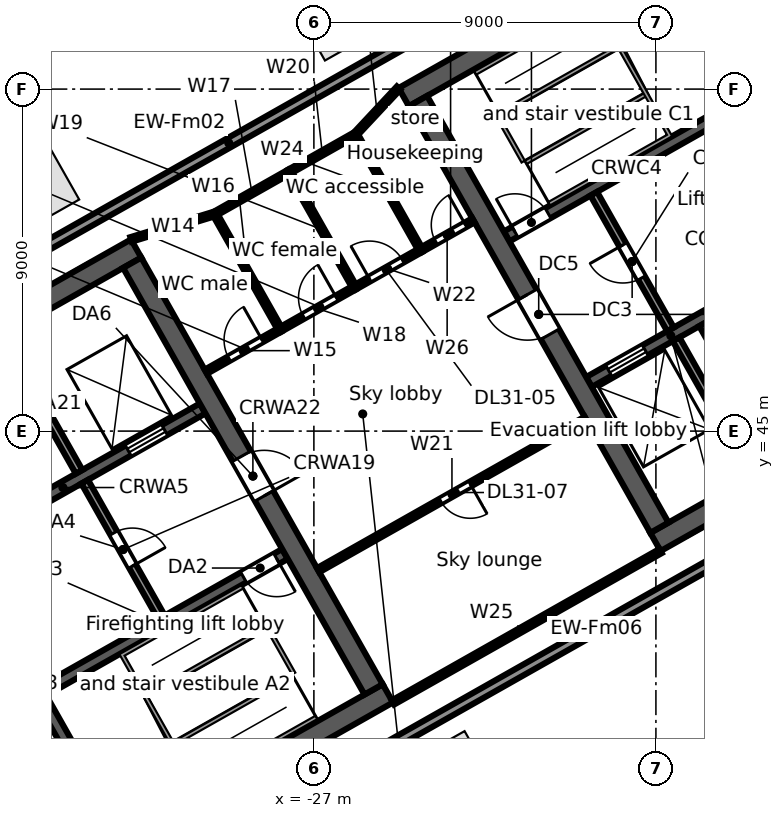
"""IFC4 building model, lengths in metres.
Left out: names, types, materials, properties, quantities, classifications, styles, units other than length and angle.
Written with IfcOpenShell. Run it as: python <this file> out.ifc"""

import sys

from ifc_helpers import new_model, si_unit, direction, frame, frame_2d, origin, origin_2d, place, context, subcontext, project, spatial, rectangle, extrude, element, fill, save


model = new_model("IFC4")
c1 = context("Model", 3, precision=1e-05, world=origin(), true_north=direction((0.0, 1.0)))
c2 = subcontext(c1, "Body", "Model", "MODEL_VIEW")
j1 = project(units=[si_unit("LENGTHUNIT", "METRE"), si_unit("PLANEANGLEUNIT", "RADIAN")], contexts=[c1])
p1 = place(None, origin())
s1 = spatial("IfcSite", under=j1, at=p1, CompositionType="ELEMENT")
p2 = place(p1, origin())
s2 = spatial("IfcBuilding", under=s1, at=p2, CompositionType="ELEMENT")
p3 = place(p2, frame((0.0, 0.0, 149.9)))
s3 = spatial("IfcBuildingStorey", under=s2, at=p3, CompositionType="ELEMENT", Elevation=149.9)
for number, where, z_axis, x_axis in (
    (1, (-26.388, 55.91, 0.0), (0.0, 0.0, 1.0), (-0.87, -0.492, 0.0)),
    (2, (-34.334, 51.414, 0.0), (0.0, 0.0, 1.0), (-0.87, -0.492, 0.0)),
    (3, (-23.356, 35.946, 0.0), (0.0, 0.0, 1.0), (0.87, 0.492, 0.0)),
):
    element("IfcColumn", number, at=place(p3, frame(where, z_axis=z_axis, x_axis=x_axis)), inside=s3, PredefinedType="COLUMN", context=c2, shape_type="SweptSolid", body=[
        extrude(rectangle(XDim=1.7, YDim=1.7, at=origin_2d()), origin(), (0.0, 0.0, 1.0), 5.0),
    ])
p4 = place(p3, frame((-56.251, 37.302, 0.0), z_axis=(0.0, 0.0, 1.0), x_axis=(0.87035543516, 0.49242402103, 0.0)))
e4 = element("IfcWall", 4, at=p4, inside=s3, PredefinedType="STANDARD", context=c2, shape_type="SweptSolid", body=[
    extrude(rectangle(XDim=62.067, YDim=0.25, at=frame_2d((31.033, 0.0))), origin(), (0.0, 0.0, 1.0), 3.872),
])
p5 = place(p3, frame((-0.364, 50.666, 0.0), z_axis=(0.0, 0.0, 1.0), x_axis=(-0.870355021882, -0.492424751494, 0.0)))
e5 = element("IfcWall", 5, at=p5, inside=s3, PredefinedType="STANDARD", context=c2, shape_type="SweptSolid", body=[
    extrude(rectangle(XDim=44.126, YDim=0.25, at=frame_2d((22.063, 0.0))), origin(), (0.0, 0.0, 1.0), 3.768),
])
p6 = place(p3, frame((-39.85, 29.727, 0.0), z_axis=(0.0, 0.0, 1.0), x_axis=(0.870359753402, 0.492416388494, 0.0)))
e6 = element("IfcWall", 6, at=p6, inside=s3, PredefinedType="SOLIDWALL", context=c2, shape_type="SweptSolid", body=[
    extrude(rectangle(XDim=17.0, YDim=0.55, at=frame_2d((8.5, 0.0))), origin(), (0.0, 0.0, 1.0), 4.68),
])
p7 = place(p6, frame((7.2, 0.0, 0.0)))
e7 = element("IfcOpeningElement", 7, at=p7, cuts=e6, PredefinedType="OPENING", context=c2, shape_type="SweptSolid", body=[
    extrude(rectangle(XDim=1.2, YDim=2.1, at=frame_2d((0.6, 1.05))), frame((0.0, 0.285, 0.0), z_axis=(0.0, -1.0, 0.0), x_axis=(1.0, 0.0, 0.0)), (0.0, 0.0, 1.0), 0.57),
])
p8 = place(p3, frame((-34.245, 38.097, 0.0), z_axis=(0.0, 0.0, 1.0), x_axis=(0.870360741098, 0.49241464271, 0.0)))
e8 = element("IfcWall", 8, at=p8, inside=s3, PredefinedType="SOLIDWALL", context=c2, shape_type="SweptSolid", body=[
    extrude(rectangle(XDim=7.45, YDim=0.3, at=frame_2d((3.725, 0.0))), origin(), (0.0, 0.0, 1.0), 4.68),
])
p9 = place(p8, frame((6.2, 0.0, 0.0)))
e9 = element("IfcOpeningElement", 9, at=p9, cuts=e8, PredefinedType="OPENING", context=c2, shape_type="SweptSolid", body=[
    extrude(rectangle(XDim=1.0, YDim=2.1, at=frame_2d((0.5, 1.05))), frame((0.0, 0.16, 0.0), z_axis=(0.0, -1.0, 0.0), x_axis=(1.0, 0.0, 0.0)), (0.0, 0.0, 1.0), 0.32),
])
p10 = place(p3, frame((-37.282, 41.435, 0.0), z_axis=(0.0, 0.0, 1.0), x_axis=(0.870359895813, 0.492416136779, 0.0)))
e10 = element("IfcWall", 10, at=p10, inside=s3, PredefinedType="SOLIDWALL", context=c2, shape_type="SweptSolid", body=[
    extrude(rectangle(XDim=8.45, YDim=0.3, at=frame_2d((4.225, 0.0))), origin(), (0.0, 0.0, 1.0), 4.68),
])
p11 = place(p10, frame((6.2, 0.0, 0.0)))
e11 = element("IfcOpeningElement", 11, at=p11, cuts=e10, PredefinedType="OPENING", context=c2, shape_type="SweptSolid", body=[
    extrude(rectangle(XDim=1.1, YDim=2.1, at=frame_2d((0.55, 1.05))), frame((0.0, 0.16, 0.0), z_axis=(0.0, -1.0, 0.0), x_axis=(1.0, 0.0, 0.0)), (0.0, 0.0, 1.0), 0.32),
])
p12 = place(p10, frame((1.95, 0.0, 0.0)))
e12 = element("IfcOpeningElement", 12, at=p12, cuts=e10, PredefinedType="OPENING", context=c2, shape_type="SweptSolid", body=[
    extrude(rectangle(XDim=0.9, YDim=2.1, at=frame_2d((0.45, 1.05))), frame((0.0, 0.16, 0.0), z_axis=(0.0, -1.0, 0.0), x_axis=(1.0, 0.0, 0.0)), (0.0, 0.0, 1.0), 0.32),
])
p13 = place(p3, frame((-46.473, 41.434, 0.0), z_axis=(0.0, 0.0, 1.0), x_axis=(0.870359753402, 0.492416388494, 0.0)))
e13 = element("IfcWall", 13, at=p13, inside=s3, PredefinedType="SOLIDWALL", context=c2, shape_type="SweptSolid", body=[
    extrude(rectangle(XDim=17.0, YDim=0.55, at=frame_2d((8.5, 0.0))), origin(), (0.0, 0.0, 1.0), 4.68),
])
p14 = place(p3, frame((-34.171, 37.967, 0.0), z_axis=(0.0, 0.0, 1.0), x_axis=(0.492382931784, -0.870378681085, 0.0)))
e14 = element("IfcWall", 14, at=p14, inside=s3, PredefinedType="SOLIDWALL", context=c2, shape_type="SweptSolid", body=[
    extrude(rectangle(XDim=4.1, YDim=0.3, at=frame_2d((2.05, 0.0))), origin(), (0.0, 0.0, 1.0), 4.68),
])
p15 = place(p3, frame((-33.031, 43.667, 0.0), z_axis=(0.0, 0.0, 1.0), x_axis=(0.492408451753, -0.87036424366, 0.0)))
e15 = element("IfcWall", 15, at=p15, inside=s3, PredefinedType="PARTITIONING", context=c2, shape_type="SweptSolid", body=[
    extrude(rectangle(XDim=4.1, YDim=0.2, at=frame_2d((2.05, 0.0))), origin(), (0.0, 0.0, 1.0), 4.68),
])
p16 = place(p15, frame((1.55, 0.0, 0.0)))
e16 = element("IfcOpeningElement", 16, at=p16, cuts=e15, PredefinedType="OPENING", context=c2, shape_type="SweptSolid", body=[
    extrude(rectangle(XDim=1.0, YDim=2.1, at=frame_2d((0.5, 1.05))), frame((0.0, 0.11, 0.0), z_axis=(0.0, -1.0, 0.0), x_axis=(1.0, 0.0, 0.0)), (0.0, 0.0, 1.0), 0.22),
])
p17 = place(p3, frame((-35.197, 47.497, 0.0), z_axis=(0.0, 0.0, 1.0), x_axis=(0.492453559952, -0.87033872216, 0.0)))
e17 = element("IfcWall", 17, at=p17, inside=s3, PredefinedType="SOLIDWALL", context=c2, shape_type="SweptSolid", body=[
    extrude(rectangle(XDim=4.1, YDim=0.2, at=frame_2d((2.05, 0.0))), origin(), (0.0, 0.0, 1.0), 4.68),
])
p18 = place(p3, frame((-31.781, 49.43, 0.0), z_axis=(0.0, 0.0, 1.0), x_axis=(0.492427022044, -0.870353737259, 0.0)))
e18 = element("IfcWall", 18, at=p18, inside=s3, PredefinedType="SOLIDWALL", context=c2, shape_type="SweptSolid", body=[
    extrude(rectangle(XDim=12.9, YDim=0.55, at=frame_2d((6.45, 0.0))), origin(), (0.0, 0.0, 1.0), 4.68),
])
p19 = place(p18, frame((5.85, 0.0, 0.0)))
e19 = element("IfcOpeningElement", 19, at=p19, cuts=e18, PredefinedType="OPENING", context=c2, shape_type="SweptSolid", body=[
    extrude(rectangle(XDim=1.2, YDim=2.1, at=frame_2d((0.6, 1.05))), frame((0.0, 0.285, 0.0), z_axis=(0.0, -1.0, 0.0), x_axis=(1.0, 0.0, 0.0)), (0.0, 0.0, 1.0), 0.57),
])
p20 = place(p3, frame((-18.012, 42.083, 0.0), z_axis=(0.0, 0.0, 1.0), x_axis=(0.870360574057, 0.492414937962, 0.0)))
e20 = element("IfcWall", 20, at=p20, inside=s3, PredefinedType="SOLIDWALL", context=c2, shape_type="SweptSolid", body=[
    extrude(rectangle(XDim=15.0, YDim=0.55, at=frame_2d((7.5, 0.0))), origin(), (0.0, 0.0, 1.0), 4.68),
])
p21 = place(p20, frame((6.1, 0.0, 0.0)))
e21 = element("IfcOpeningElement", 21, at=p21, cuts=e20, PredefinedType="OPENING", context=c2, shape_type="SweptSolid", body=[
    extrude(rectangle(XDim=1.2, YDim=2.1, at=frame_2d((0.6, 1.05))), frame((0.0, 0.285, 0.0), z_axis=(0.0, -1.0, 0.0), x_axis=(1.0, 0.0, 0.0)), (0.0, 0.0, 1.0), 0.57),
])
p22 = place(p3, frame((-19.762, 46.292, 0.0), z_axis=(0.0, 0.0, 1.0), x_axis=(0.870359758983, 0.49241637863, 0.0)))
e22 = element("IfcWall", 22, at=p22, inside=s3, PredefinedType="SOLIDWALL", context=c2, shape_type="SweptSolid", body=[
    extrude(rectangle(XDim=4.95, YDim=0.3, at=frame_2d((2.475, 0.0))), origin(), (0.0, 0.0, 1.0), 4.68),
])
p23 = place(p22, frame((0.6, 0.0, 0.0)))
e23 = element("IfcOpeningElement", 23, at=p23, cuts=e22, PredefinedType="OPENING", context=c2, shape_type="SweptSolid", body=[
    extrude(rectangle(XDim=1.1, YDim=2.1, at=frame_2d((0.55, 1.05))), frame((0.0, 0.16, 0.0), z_axis=(0.0, -1.0, 0.0), x_axis=(1.0, 0.0, 0.0)), (0.0, 0.0, 1.0), 0.32),
])
p24 = place(p22, frame((3.7, 0.0, 0.0)))
e24 = element("IfcOpeningElement", 24, at=p24, cuts=e22, PredefinedType="OPENING", context=c2, shape_type="SweptSolid", body=[
    extrude(rectangle(XDim=0.9, YDim=2.1, at=frame_2d((0.45, 1.05))), frame((0.0, 0.16, 0.0), z_axis=(0.0, -1.0, 0.0), x_axis=(1.0, 0.0, 0.0)), (0.0, 0.0, 1.0), 0.32),
])
p25 = place(p3, frame((-21.928, 50.121, 0.0), z_axis=(0.0, 0.0, 1.0), x_axis=(0.870340732628, 0.49245000673, 0.0)))
e25 = element("IfcWall", 25, at=p25, inside=s3, PredefinedType="SOLIDWALL", context=c2, shape_type="SweptSolid", body=[
    extrude(rectangle(XDim=7.25, YDim=0.3, at=frame_2d((3.625, 0.0))), origin(), (0.0, 0.0, 1.0), 4.68),
])
p26 = place(p25, frame((0.25, 0.0, 0.0)))
e26 = element("IfcOpeningElement", 26, at=p26, cuts=e25, PredefinedType="OPENING", context=c2, shape_type="SweptSolid", body=[
    extrude(rectangle(XDim=1.0, YDim=2.1, at=frame_2d((0.5, 1.05))), frame((0.0, 0.16, 0.0), z_axis=(0.0, -1.0, 0.0), x_axis=(1.0, 0.0, 0.0)), (0.0, 0.0, 1.0), 0.32),
])
p27 = place(p3, frame((-24.635, 53.789, 0.0), z_axis=(0.0, 0.0, 1.0), x_axis=(0.870360574057, 0.492414937962, 0.0)))
e27 = element("IfcWall", 27, at=p27, inside=s3, PredefinedType="SOLIDWALL", context=c2, shape_type="SweptSolid", body=[
    extrude(rectangle(XDim=15.0, YDim=0.55, at=frame_2d((7.5, 0.0))), origin(), (0.0, 0.0, 1.0), 4.68),
])
p28 = place(p3, frame((-24.26, 53.685, 0.0), z_axis=(0.0, 0.0, 1.0), x_axis=(0.492427022044, -0.870353737259, 0.0)))
e28 = element("IfcWall", 28, at=p28, inside=s3, PredefinedType="SOLIDWALL", context=c2, shape_type="SweptSolid", body=[
    extrude(rectangle(XDim=12.9, YDim=0.55, at=frame_2d((6.45, 0.0))), origin(), (0.0, 0.0, 1.0), 4.68),
])
p29 = place(p28, frame((5.85, 0.0, 0.0)))
e29 = element("IfcOpeningElement", 29, at=p29, cuts=e28, PredefinedType="OPENING", context=c2, shape_type="SweptSolid", body=[
    extrude(rectangle(XDim=1.2, YDim=2.1, at=frame_2d((0.6, 1.05))), frame((0.0, 0.285, 0.0), z_axis=(0.0, -1.0, 0.0), x_axis=(1.0, 0.0, 0.0)), (0.0, 0.0, 1.0), 0.57),
])
p30 = place(p3, frame((-17.469, 47.417, 0.0), z_axis=(0.0, 0.0, 1.0), x_axis=(0.492453559952, -0.87033872216, 0.0)))
e30 = element("IfcWall", 30, at=p30, inside=s3, PredefinedType="SOLIDWALL", context=c2, shape_type="SweptSolid", body=[
    extrude(rectangle(XDim=4.1, YDim=0.2, at=frame_2d((2.05, 0.0))), origin(), (0.0, 0.0, 1.0), 4.68),
])
p31 = place(p3, frame((-19.635, 51.246, 0.0), z_axis=(0.0, 0.0, 1.0), x_axis=(0.492408451753, -0.87036424366, 0.0)))
e31 = element("IfcWall", 31, at=p31, inside=s3, PredefinedType="PARTITIONING", context=c2, shape_type="SweptSolid", body=[
    extrude(rectangle(XDim=4.1, YDim=0.2, at=frame_2d((2.05, 0.0))), origin(), (0.0, 0.0, 1.0), 4.68),
])
p32 = place(p31, frame((1.55, 0.0, 0.0)))
e32 = element("IfcOpeningElement", 32, at=p32, cuts=e31, PredefinedType="OPENING", context=c2, shape_type="SweptSolid", body=[
    extrude(rectangle(XDim=1.0, YDim=2.1, at=frame_2d((0.5, 1.05))), frame((0.0, 0.11, 0.0), z_axis=(0.0, -1.0, 0.0), x_axis=(1.0, 0.0, 0.0)), (0.0, 0.0, 1.0), 0.22),
])
p33 = place(p3, frame((-16.772, 47.811, 0.0), z_axis=(0.0, 0.0, 1.0), x_axis=(0.492428039142, -0.870353161807, 0.0)))
e33 = element("IfcWall", 33, at=p33, inside=s3, PredefinedType="SOLIDWALL", context=c2, shape_type="SweptSolid", body=[
    extrude(rectangle(XDim=4.1, YDim=0.2, at=frame_2d((2.05, 0.0))), origin(), (0.0, 0.0, 1.0), 4.68),
])
p34 = place(p3, frame((-17.711, 57.39, 0.0), z_axis=(0.0, 0.0, 1.0), x_axis=(0.492408451753, -0.87036424366, 0.0)))
e34 = element("IfcWall", 34, at=p34, inside=s3, PredefinedType="SOLIDWALL", context=c2, shape_type="SweptSolid", body=[
    extrude(rectangle(XDim=4.1, YDim=0.3, at=frame_2d((2.05, 0.0))), origin(), (0.0, 0.0, 1.0), 4.68),
])
p35 = place(p3, frame((-31.812, 50.044, 0.0), z_axis=(0.0, 0.0, 1.0), x_axis=(0.956397612161, 0.292067813107, 0.0)))
e35 = element("IfcWall", 35, at=p35, inside=s3, PredefinedType="PARTITIONING", context=c2, shape_type="SweptSolid", body=[
    extrude(rectangle(XDim=2.305, YDim=0.125, at=frame_2d((1.152, 0.0))), origin(), (0.0, 0.0, 1.0), 4.68),
])
p36 = place(p3, frame((-29.843, 46.563, 0.0), z_axis=(0.0, 0.0, 1.0), x_axis=(0.870437546499, 0.492278861667, 0.0)))
e36 = element("IfcWall", 36, at=p36, inside=s3, PredefinedType="PARTITIONING", context=c2, shape_type="SweptSolid", body=[
    extrude(rectangle(XDim=2.25, YDim=0.125, at=frame_2d((1.125, 0.0))), origin(), (0.0, 0.0, 1.0), 4.68),
])
p37 = place(p36, frame((0.7, 0.0, 0.0)))
e37 = element("IfcOpeningElement", 37, at=p37, cuts=e36, PredefinedType="OPENING", context=c2, shape_type="SweptSolid", body=[
    extrude(rectangle(XDim=1.0, YDim=2.1, at=frame_2d((0.5, 1.05))), frame((0.0, 0.073, 0.0), z_axis=(0.0, -1.0, 0.0), x_axis=(1.0, 0.0, 0.0)), (0.0, 0.0, 1.0), 0.145),
])
p38 = place(p3, frame((-29.608, 50.717, 0.0), z_axis=(0.0, 0.0, 1.0), x_axis=(0.492521469645, -0.870300294116, 0.0)))
e38 = element("IfcWall", 38, at=p38, inside=s3, PredefinedType="PARTITIONING", context=c2, shape_type="SweptSolid", body=[
    extrude(rectangle(XDim=3.5, YDim=0.125, at=frame_2d((1.75, 0.0))), origin(), (0.0, 0.0, 1.0), 4.68),
])
p39 = place(p3, frame((-29.608, 50.717, 0.0), z_axis=(0.0, 0.0, 1.0), x_axis=(0.870332332106, 0.492464853254, 0.0)))
e39 = element("IfcWall", 39, at=p39, inside=s3, PredefinedType="PARTITIONING", context=c2, shape_type="SweptSolid", body=[
    extrude(rectangle(XDim=2.25, YDim=0.125, at=frame_2d((1.125, 0.0))), origin(), (0.0, 0.0, 1.0), 4.68),
])
p40 = place(p3, frame((-27.884, 47.671, 0.0), z_axis=(0.0, 0.0, 1.0), x_axis=(0.870285818058, 0.4925470484, 0.0)))
e40 = element("IfcWall", 40, at=p40, inside=s3, PredefinedType="PARTITIONING", context=c2, shape_type="SweptSolid", body=[
    extrude(rectangle(XDim=2.25, YDim=0.125, at=frame_2d((1.125, 0.0))), origin(), (0.0, 0.0, 1.0), 4.68),
])
p41 = place(p40, frame((0.7, 0.0, 0.0)))
e41 = element("IfcOpeningElement", 41, at=p41, cuts=e40, PredefinedType="OPENING", context=c2, shape_type="SweptSolid", body=[
    extrude(rectangle(XDim=1.0, YDim=2.1, at=frame_2d((0.5, 1.05))), frame((0.0, 0.073, 0.0), z_axis=(0.0, -1.0, 0.0), x_axis=(1.0, 0.0, 0.0)), (0.0, 0.0, 1.0), 0.145),
])
p42 = place(p3, frame((-27.65, 51.825, 0.0), z_axis=(0.0, 0.0, 1.0), x_axis=(0.492551369934, -0.870283372228, 0.0)))
e42 = element("IfcWall", 42, at=p42, inside=s3, PredefinedType="PARTITIONING", context=c2, shape_type="SweptSolid", body=[
    extrude(rectangle(XDim=3.5, YDim=0.125, at=frame_2d((1.75, 0.0))), origin(), (0.0, 0.0, 1.0), 4.68),
])
p43 = place(p3, frame((-27.65, 51.825, 0.0), z_axis=(0.0, 0.0, 1.0), x_axis=(0.870330884088, 0.492467412326, 0.0)))
e43 = element("IfcWall", 43, at=p43, inside=s3, PredefinedType="PARTITIONING", context=c2, shape_type="SweptSolid", body=[
    extrude(rectangle(XDim=2.0, YDim=0.125, at=frame_2d((1.0, 0.0))), origin(), (0.0, 0.0, 1.0), 4.68),
])
p44 = place(p3, frame((-26.888, 41.34, 0.0), z_axis=(0.0, 0.0, 1.0), x_axis=(0.870318838095, 0.492488700436, 0.0)))
e44 = element("IfcWall", 44, at=p44, inside=s3, PredefinedType="PARTITIONING", context=c2, shape_type="SweptSolid", body=[
    extrude(rectangle(XDim=8.091, YDim=0.125, at=frame_2d((4.046, 0.0))), origin(), (0.0, 0.0, 1.0), 3.852),
])
p45 = place(p44, frame((3.7, 0.0, 0.0)))
e45 = element("IfcOpeningElement", 45, at=p45, cuts=e44, PredefinedType="OPENING", context=c2, shape_type="SweptSolid", body=[
    extrude(rectangle(XDim=0.9, YDim=2.1, at=frame_2d((0.45, 1.05))), frame((0.0, 0.073, 0.0), z_axis=(0.0, -1.0, 0.0), x_axis=(1.0, 0.0, 0.0)), (0.0, 0.0, 1.0), 0.145),
])
p46 = place(p3, frame((-25.926, 48.779, 0.0), z_axis=(0.0, 0.0, 1.0), x_axis=(0.870474108635, 0.492214207633, 0.0)))
e46 = element("IfcWall", 46, at=p46, inside=s3, PredefinedType="PARTITIONING", context=c2, shape_type="SweptSolid", body=[
    extrude(rectangle(XDim=1.999, YDim=0.125, at=frame_2d((1.0, 0.0))), origin(), (0.0, 0.0, 1.0), 4.68),
])
p47 = place(p46, frame((0.45, 0.0, 0.0)))
e47 = element("IfcOpeningElement", 47, at=p47, cuts=e46, PredefinedType="OPENING", context=c2, shape_type="SweptSolid", body=[
    extrude(rectangle(XDim=1.0, YDim=2.1, at=frame_2d((0.5, 1.05))), frame((0.0, 0.073, 0.0), z_axis=(0.0, -1.0, 0.0), x_axis=(1.0, 0.0, 0.0)), (0.0, 0.0, 1.0), 0.145),
])
p48 = place(p3, frame((-25.909, 52.81, 0.0), z_axis=(0.0, 0.0, 1.0), x_axis=(0.682678244456, 0.730719107829, 0.0)))
e48 = element("IfcWall", 48, at=p48, inside=s3, PredefinedType="PARTITIONING", context=c2, shape_type="SweptSolid", body=[
    extrude(rectangle(XDim=1.667, YDim=0.125, at=frame_2d((0.833, 0.0))), origin(), (0.0, 0.0, 1.0), 3.852),
])
p49 = place(p3, frame((-25.909, 52.81, 0.0), z_axis=(0.0, 0.0, 1.0), x_axis=(0.492190545807, -0.870487487916, 0.0)))
e49 = element("IfcWall", 49, at=p49, inside=s3, PredefinedType="PARTITIONING", context=c2, shape_type="SweptSolid", body=[
    extrude(rectangle(XDim=3.5, YDim=0.125, at=frame_2d((1.75, 0.0))), origin(), (0.0, 0.0, 1.0), 4.68),
])
p50 = place(p3, frame((-24.919, 37.859, 0.0), z_axis=(0.0, 0.0, 1.0), x_axis=(0.870357635969, 0.492420131098, 0.0)))
e50 = element("IfcWall", 50, at=p50, inside=s3, PredefinedType="PARTITIONING", context=c2, shape_type="SweptSolid", body=[
    extrude(rectangle(XDim=8.091, YDim=0.125, at=frame_2d((4.045, 0.0))), origin(), (0.0, 0.0, 1.0), 3.852),
])
p51 = place(p3, frame((-24.186, 49.763, 0.0), z_axis=(0.0, 0.0, 1.0), x_axis=(0.870199776528, 0.492699044986, 0.0)))
e51 = element("IfcWall", 51, at=p51, inside=s3, PredefinedType="PARTITIONING", context=c2, shape_type="SweptSolid", body=[
    extrude(rectangle(XDim=1.592, YDim=0.125, at=frame_2d((0.796, 0.0))), origin(), (0.0, 0.0, 1.0), 3.852),
])
p52 = place(p51, frame((0.45, 0.0, 0.0)))
e52 = element("IfcOpeningElement", 52, at=p52, cuts=e51, PredefinedType="OPENING", context=c2, shape_type="SweptSolid", body=[
    extrude(rectangle(XDim=0.9, YDim=2.1, at=frame_2d((0.45, 1.05))), frame((0.0, 0.073, 0.0), z_axis=(0.0, -1.0, 0.0), x_axis=(1.0, 0.0, 0.0)), (0.0, 0.0, 1.0), 0.145),
])
p53 = place(p11, origin())
e53 = element("IfcDoor", 53, at=p53, inside=s3, OperationType="DOUBLE_DOOR_SLIDING", PredefinedType="DOOR", context=c2, shape_type="SweptSolid", body=[
    extrude(rectangle(XDim=1.1, YDim=2.1, at=frame_2d((0.55, 1.05))), frame((0.0, 0.025, 0.0), z_axis=(0.0, -1.0, 0.0), x_axis=(1.0, 0.0, 0.0)), (0.0, 0.0, 1.0), 0.05),
])
fill(e11, e53)
p54 = place(p9, frame((1.0, 0.0, 0.0), z_axis=(0.0, 0.0, 1.0), x_axis=(-1.0, 0.0, 0.0)))
e54 = element("IfcDoor", 54, at=p54, inside=s3, OperationType="SINGLE_SWING_LEFT", PredefinedType="DOOR", context=c2, shape_type="SweptSolid", body=[
    extrude(rectangle(XDim=1.0, YDim=2.1, at=frame_2d((0.5, 1.05))), frame((0.0, 0.025, 0.0), z_axis=(0.0, -1.0, 0.0), x_axis=(1.0, 0.0, 0.0)), (0.0, 0.0, 1.0), 0.05),
])
fill(e9, e54)
p55 = place(p16, origin())
e55 = element("IfcDoor", 55, at=p55, inside=s3, OperationType="SINGLE_SWING_RIGHT", PredefinedType="DOOR", context=c2, shape_type="SweptSolid", body=[
    extrude(rectangle(XDim=1.0, YDim=2.1, at=frame_2d((0.5, 1.05))), frame((0.0, 0.025, 0.0), z_axis=(0.0, -1.0, 0.0), x_axis=(1.0, 0.0, 0.0)), (0.0, 0.0, 1.0), 0.05),
])
fill(e16, e55)
p56 = place(p19, origin())
e56 = element("IfcDoor", 56, at=p56, inside=s3, OperationType="SINGLE_SWING_RIGHT", PredefinedType="DOOR", context=c2, shape_type="SweptSolid", body=[
    extrude(rectangle(XDim=1.2, YDim=2.1, at=frame_2d((0.6, 1.05))), frame((0.0, 0.025, 0.0), z_axis=(0.0, -1.0, 0.0), x_axis=(1.0, 0.0, 0.0)), (0.0, 0.0, 1.0), 0.05),
])
fill(e19, e56)
p57 = place(p23, origin())
e57 = element("IfcDoor", 57, at=p57, inside=s3, OperationType="DOUBLE_DOOR_SLIDING", PredefinedType="DOOR", context=c2, shape_type="SweptSolid", body=[
    extrude(rectangle(XDim=1.1, YDim=2.1, at=frame_2d((0.55, 1.05))), frame((0.0, 0.025, 0.0), z_axis=(0.0, -1.0, 0.0), x_axis=(1.0, 0.0, 0.0)), (0.0, 0.0, 1.0), 0.05),
])
fill(e23, e57)
p58 = place(p26, origin())
e58 = element("IfcDoor", 58, at=p58, inside=s3, OperationType="SINGLE_SWING_LEFT", PredefinedType="DOOR", context=c2, shape_type="SweptSolid", body=[
    extrude(rectangle(XDim=1.0, YDim=2.1, at=frame_2d((0.5, 1.05))), frame((0.0, 0.025, 0.0), z_axis=(0.0, -1.0, 0.0), x_axis=(1.0, 0.0, 0.0)), (0.0, 0.0, 1.0), 0.05),
])
fill(e26, e58)
p59 = place(p32, frame((1.0, 0.0, 0.0), z_axis=(0.0, 0.0, 1.0), x_axis=(-1.0, 0.0, 0.0)))
e59 = element("IfcDoor", 59, at=p59, inside=s3, OperationType="SINGLE_SWING_RIGHT", PredefinedType="DOOR", context=c2, shape_type="SweptSolid", body=[
    extrude(rectangle(XDim=1.0, YDim=2.1, at=frame_2d((0.5, 1.05))), frame((0.0, 0.025, 0.0), z_axis=(0.0, -1.0, 0.0), x_axis=(1.0, 0.0, 0.0)), (0.0, 0.0, 1.0), 0.05),
])
fill(e32, e59)
p60 = place(p29, frame((1.2, 0.0, 0.0), z_axis=(0.0, 0.0, 1.0), x_axis=(-1.0, 0.0, 0.0)))
e60 = element("IfcDoor", 60, at=p60, inside=s3, OperationType="SINGLE_SWING_RIGHT", PredefinedType="DOOR", context=c2, shape_type="SweptSolid", body=[
    extrude(rectangle(XDim=1.2, YDim=2.1, at=frame_2d((0.6, 1.05))), frame((0.0, 0.025, 0.0), z_axis=(0.0, -1.0, 0.0), x_axis=(1.0, 0.0, 0.0)), (0.0, 0.0, 1.0), 0.05),
])
fill(e29, e60)
p61 = place(p37, origin())
e61 = element("IfcDoor", 61, at=p61, inside=s3, OperationType="SINGLE_SWING_RIGHT", PredefinedType="DOOR", context=c2, shape_type="SweptSolid", body=[
    extrude(rectangle(XDim=1.0, YDim=2.1, at=frame_2d((0.5, 1.05))), frame((0.0, 0.025, 0.0), z_axis=(0.0, -1.0, 0.0), x_axis=(1.0, 0.0, 0.0)), (0.0, 0.0, 1.0), 0.05),
])
fill(e37, e61)
p62 = place(p41, origin())
e62 = element("IfcDoor", 62, at=p62, inside=s3, OperationType="SINGLE_SWING_RIGHT", PredefinedType="DOOR", context=c2, shape_type="SweptSolid", body=[
    extrude(rectangle(XDim=1.0, YDim=2.1, at=frame_2d((0.5, 1.05))), frame((0.0, 0.025, 0.0), z_axis=(0.0, -1.0, 0.0), x_axis=(1.0, 0.0, 0.0)), (0.0, 0.0, 1.0), 0.05),
])
fill(e41, e62)
p63 = place(p47, origin())
e63 = element("IfcDoor", 63, at=p63, inside=s3, OperationType="SINGLE_SWING_LEFT", PredefinedType="DOOR", context=c2, shape_type="SweptSolid", body=[
    extrude(rectangle(XDim=1.0, YDim=2.1, at=frame_2d((0.5, 1.05))), frame((0.0, 0.025, 0.0), z_axis=(0.0, -1.0, 0.0), x_axis=(1.0, 0.0, 0.0)), (0.0, 0.0, 1.0), 0.05),
])
fill(e47, e63)
p64 = place(p52, origin())
e64 = element("IfcDoor", 64, at=p64, inside=s3, OperationType="SINGLE_SWING_RIGHT", PredefinedType="DOOR", context=c2, shape_type="SweptSolid", body=[
    extrude(rectangle(XDim=0.9, YDim=2.1, at=frame_2d((0.45, 1.05))), frame((0.0, 0.025, 0.0), z_axis=(0.0, -1.0, 0.0), x_axis=(1.0, 0.0, 0.0)), (0.0, 0.0, 1.0), 0.05),
])
fill(e52, e64)
p65 = place(p45, frame((0.9, 0.0, 0.0), z_axis=(0.0, 0.0, 1.0), x_axis=(-1.0, 0.0, 0.0)))
e65 = element("IfcDoor", 65, at=p65, inside=s3, OperationType="SINGLE_SWING_LEFT", PredefinedType="DOOR", context=c2, shape_type="SweptSolid", body=[
    extrude(rectangle(XDim=0.9, YDim=2.1, at=frame_2d((0.45, 1.05))), frame((0.0, 0.025, 0.0), z_axis=(0.0, -1.0, 0.0), x_axis=(1.0, 0.0, 0.0)), (0.0, 0.0, 1.0), 0.05),
])
fill(e45, e65)
save(model, sys.argv[1])
